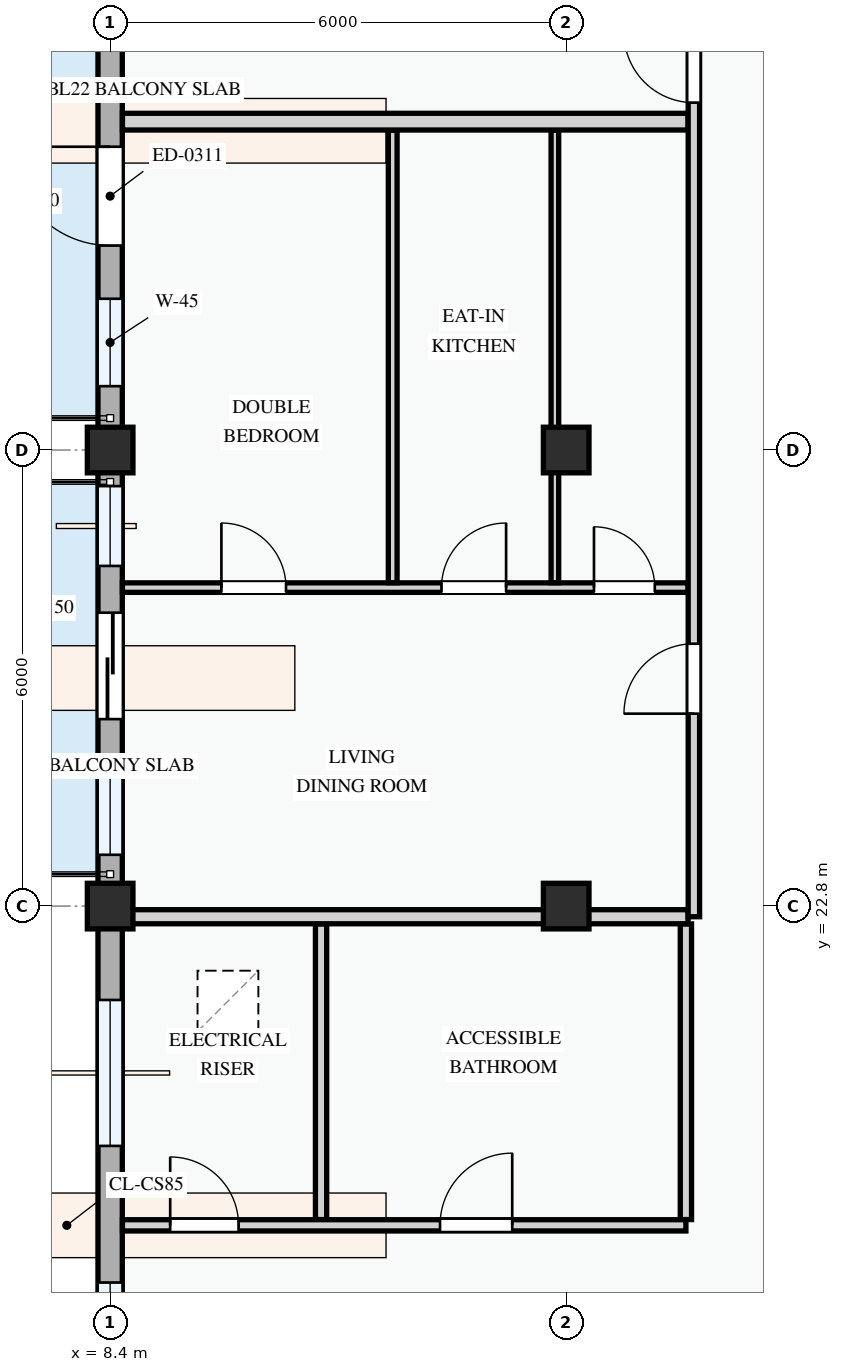
"""IFC4 building model, lengths in metres.
Left out: names, types, materials, properties, quantities, classifications, styles, units other than length and angle.
Written with IfcOpenShell. Run it as: python <this file> out.ifc"""

import sys

from ifc_helpers import new_model, si_unit, direction, frame, frame_2d, origin, origin_2d, place, context, subcontext, project, spatial, rectangle, extrude, element, fill, save


model = new_model("IFC4")
c1 = context("Model", 3, precision=1e-05, world=origin(), true_north=direction((0.0, 1.0)))
c2 = subcontext(c1, "Body", "Model", "MODEL_VIEW")
j1 = project(units=[si_unit("LENGTHUNIT", "METRE"), si_unit("PLANEANGLEUNIT", "RADIAN")], contexts=[c1])
p1 = place(None, origin())
s1 = spatial("IfcSite", under=j1, at=p1, CompositionType="ELEMENT")
p2 = place(p1, origin())
s2 = spatial("IfcBuilding", under=s1, at=p2, CompositionType="ELEMENT")
p3 = place(p2, frame((0.0, 0.0, 14.7)))
s3 = spatial("IfcBuildingStorey", under=s2, at=p3, CompositionType="ELEMENT", Elevation=14.7)
for number, where, z_axis, x_axis in (
    (1, (8.4, 22.8, 0.0), (0.0, 0.0, 1.0), (1.0, 0.0, 0.0)),
    (2, (8.4, 28.8, 0.0), (0.0, 0.0, 1.0), (1.0, 0.0, 0.0)),
    (3, (14.4, 22.8, 0.0), (0.0, 0.0, 1.0), (1.0, 0.0, 0.0)),
    (4, (14.4, 28.8, 0.0), (0.0, 0.0, 1.0), (1.0, 0.0, 0.0)),
):
    element("IfcColumn", number, at=place(p3, frame(where, z_axis=z_axis, x_axis=x_axis)), inside=s3, PredefinedType="COLUMN", context=c2, shape_type="SweptSolid", body=[
        extrude(rectangle(XDim=0.6, YDim=0.6, at=origin_2d()), origin(), (0.0, 0.0, 1.0), 3.3),
    ])
p4 = place(p3, frame((8.4, 37.2, 0.0), z_axis=(0.0, 0.0, 1.0), x_axis=(0.0, -1.0, 0.0)))
e5 = element("IfcWall", 5, at=p4, inside=s3, PredefinedType="STANDARD", context=c2, shape_type="SweptSolid", body=[
    extrude(rectangle(XDim=8.4, YDim=0.32, at=frame_2d((4.2, 0.0))), origin(), (0.0, 0.0, 1.0), 2.345),
])
p5 = place(p4, frame((4.41, 0.0, 0.0)))
e6 = element("IfcOpeningElement", 6, at=p5, cuts=e5, PredefinedType="OPENING", context=c2, shape_type="SweptSolid", body=[
    extrude(rectangle(XDim=1.3, YDim=2.15, at=frame_2d((0.65, 1.075))), frame((0.0, 0.17, 0.0), z_axis=(0.0, -1.0, 0.0), x_axis=(1.0, 0.0, 0.0)), (0.0, 0.0, 1.0), 0.34),
])
p6 = place(p4, frame((1.485, 0.0, 0.78)))
e7 = element("IfcOpeningElement", 7, at=p6, cuts=e5, PredefinedType="OPENING", context=c2, shape_type="SweptSolid", body=[
    extrude(rectangle(XDim=1.3, YDim=1.4, at=frame_2d((0.65, 0.7))), frame((0.0, 0.17, 0.0), z_axis=(0.0, -1.0, 0.0), x_axis=(1.0, 0.0, 0.0)), (0.0, 0.0, 1.0), 0.34),
])
p7 = place(p4, frame((6.41, 0.0, 0.78)))
e8 = element("IfcOpeningElement", 8, at=p7, cuts=e5, PredefinedType="OPENING", context=c2, shape_type="SweptSolid", body=[
    extrude(rectangle(XDim=1.15, YDim=1.25, at=frame_2d((0.575, 0.625))), frame((0.0, 0.17, 0.0), z_axis=(0.0, -1.0, 0.0), x_axis=(1.0, 0.0, 0.0)), (0.0, 0.0, 1.0), 0.34),
])
p8 = place(p3, frame((8.4, 28.8, 0.0), z_axis=(0.0, 0.0, 1.0), x_axis=(0.0, -1.0, 0.0)))
e9 = element("IfcWall", 9, at=p8, inside=s3, PredefinedType="STANDARD", context=c2, shape_type="SweptSolid", body=[
    extrude(rectangle(XDim=6.0, YDim=0.32, at=frame_2d((3.0, 0.0))), origin(), (0.0, 0.0, 1.0), 2.445),
])
p9 = place(p8, frame((2.14, 0.0, 0.0)))
e10 = element("IfcOpeningElement", 10, at=p9, cuts=e9, PredefinedType="OPENING", context=c2, shape_type="SweptSolid", body=[
    extrude(rectangle(XDim=1.4, YDim=2.2, at=frame_2d((0.7, 1.1))), frame((0.0, 0.17, 0.0), z_axis=(0.0, -1.0, 0.0), x_axis=(1.0, 0.0, 0.0)), (0.0, 0.0, 1.0), 0.34),
])
p10 = place(p8, frame((0.475, 0.0, 0.78)))
e11 = element("IfcOpeningElement", 11, at=p10, cuts=e9, PredefinedType="OPENING", context=c2, shape_type="SweptSolid", body=[
    extrude(rectangle(XDim=1.05, YDim=1.2, at=frame_2d((0.525, 0.6))), frame((0.0, 0.17, 0.0), z_axis=(0.0, -1.0, 0.0), x_axis=(1.0, 0.0, 0.0)), (0.0, 0.0, 1.0), 0.34),
])
p11 = place(p8, frame((4.075, 0.0, 0.78)))
e12 = element("IfcOpeningElement", 12, at=p11, cuts=e9, PredefinedType="OPENING", context=c2, shape_type="SweptSolid", body=[
    extrude(rectangle(XDim=1.25, YDim=1.3, at=frame_2d((0.625, 0.65))), frame((0.0, 0.17, 0.0), z_axis=(0.0, -1.0, 0.0), x_axis=(1.0, 0.0, 0.0)), (0.0, 0.0, 1.0), 0.34),
])
p12 = place(p3, frame((8.4, 22.8, 0.0), z_axis=(0.0, 0.0, 1.0), x_axis=(0.0, -1.0, 0.0)))
e13 = element("IfcWall", 13, at=p12, inside=s3, PredefinedType="STANDARD", context=c2, shape_type="SweptSolid", body=[
    extrude(rectangle(XDim=8.4, YDim=0.32, at=frame_2d((4.2, 0.0))), origin(), (0.0, 0.0, 1.0), 2.345),
])
p13 = place(p12, frame((1.235, 0.0, 0.78)))
e14 = element("IfcOpeningElement", 14, at=p13, cuts=e13, PredefinedType="OPENING", context=c2, shape_type="SweptSolid", body=[
    extrude(rectangle(XDim=1.92, YDim=1.44, at=frame_2d((0.96, 0.72))), frame((0.0, 0.17, 0.0), z_axis=(0.0, -1.0, 0.0), x_axis=(1.0, 0.0, 0.0)), (0.0, 0.0, 1.0), 0.34),
])
p14 = place(p12, frame((4.952, 0.0, 0.78)))
e15 = element("IfcOpeningElement", 15, at=p14, cuts=e13, PredefinedType="OPENING", context=c2, shape_type="SweptSolid", body=[
    extrude(rectangle(XDim=1.42, YDim=1.38, at=frame_2d((0.71, 0.69))), frame((0.0, 0.17, 0.0), z_axis=(0.0, -1.0, 0.0), x_axis=(1.0, 0.0, 0.0)), (0.0, 0.0, 1.0), 0.34),
])
for number, where, z_axis, x_axis in (
    (16, (11.175, 18.676, 0.0), (0.0, 0.0, 1.0), (0.0, 1.0, 0.0)),
    (17, (15.975, 18.676, 0.0), (0.0, 0.0, 1.0), (0.0, 1.0, 0.0)),
):
    element("IfcWall", number, at=place(p3, frame(where, z_axis=z_axis, x_axis=x_axis)), inside=s3, PredefinedType="PARTITIONING", context=c2, shape_type="SweptSolid", body=[
        extrude(rectangle(XDim=3.889, YDim=0.148, at=frame_2d((1.945, 0.0))), origin(), (0.0, 0.0, 1.0), 3.0),
    ])
p15 = place(p3, frame((8.562, 18.6, 0.0), z_axis=(0.0, 0.0, 1.0), x_axis=(1.0, 0.0, 0.0)))
e18 = element("IfcWall", 18, at=p15, inside=s3, PredefinedType="PARTITIONING", context=c2, shape_type="SweptSolid", body=[
    extrude(rectangle(XDim=7.413, YDim=0.148, at=frame_2d((3.707, 0.0))), origin(), (0.0, 0.0, 1.0), 3.0),
])
p16 = place(p15, frame((0.628, 0.0, 0.0)))
e19 = element("IfcOpeningElement", 19, at=p16, cuts=e18, PredefinedType="OPENING", context=c2, shape_type="SweptSolid", body=[
    extrude(rectangle(XDim=0.9, YDim=2.1, at=frame_2d((0.45, 1.05))), frame((0.0, 0.084, 0.0), z_axis=(0.0, -1.0, 0.0), x_axis=(1.0, 0.0, 0.0)), (0.0, 0.0, 1.0), 0.168),
])
p17 = place(p15, frame((4.178, 0.0, 0.0)))
e20 = element("IfcOpeningElement", 20, at=p17, cuts=e18, PredefinedType="OPENING", context=c2, shape_type="SweptSolid", body=[
    extrude(rectangle(XDim=0.95, YDim=2.1, at=frame_2d((0.475, 1.05))), frame((0.0, 0.084, 0.0), z_axis=(0.0, -1.0, 0.0), x_axis=(1.0, 0.0, 0.0)), (0.0, 0.0, 1.0), 0.168),
])
p18 = place(p3, frame((8.562, 26.99, 0.0), z_axis=(0.0, 0.0, 1.0), x_axis=(1.0, 0.0, 0.0)))
e21 = element("IfcWall", 21, at=p18, inside=s3, PredefinedType="PARTITIONING", context=c2, shape_type="SweptSolid", body=[
    extrude(rectangle(XDim=7.441, YDim=0.125, at=frame_2d((3.72, 0.0))), origin(), (0.0, 0.0, 1.0), 3.0),
])
p19 = place(p18, frame((1.302, 0.0, 0.0)))
e22 = element("IfcOpeningElement", 22, at=p19, cuts=e21, PredefinedType="OPENING", context=c2, shape_type="SweptSolid", body=[
    extrude(rectangle(XDim=0.85, YDim=2.1, at=frame_2d((0.425, 1.05))), frame((0.0, 0.073, 0.0), z_axis=(0.0, -1.0, 0.0), x_axis=(1.0, 0.0, 0.0)), (0.0, 0.0, 1.0), 0.145),
])
p20 = place(p18, frame((4.198, 0.0, 0.0)))
e23 = element("IfcOpeningElement", 23, at=p20, cuts=e21, PredefinedType="OPENING", context=c2, shape_type="SweptSolid", body=[
    extrude(rectangle(XDim=0.85, YDim=2.1, at=frame_2d((0.425, 1.05))), frame((0.0, 0.073, 0.0), z_axis=(0.0, -1.0, 0.0), x_axis=(1.0, 0.0, 0.0)), (0.0, 0.0, 1.0), 0.145),
])
p21 = place(p18, frame((6.204, 0.0, 0.0)))
e24 = element("IfcOpeningElement", 24, at=p21, cuts=e21, PredefinedType="OPENING", context=c2, shape_type="SweptSolid", body=[
    extrude(rectangle(XDim=0.8, YDim=2.1, at=frame_2d((0.4, 1.05))), frame((0.0, 0.073, 0.0), z_axis=(0.0, -1.0, 0.0), x_axis=(1.0, 0.0, 0.0)), (0.0, 0.0, 1.0), 0.145),
])
p22 = place(p3, frame((12.118, 27.054, 0.0), z_axis=(0.0, 0.0, 1.0), x_axis=(0.0, 1.0, 0.0)))
e25 = element("IfcWall", 25, at=p22, inside=s3, PredefinedType="PARTITIONING", context=c2, shape_type="SweptSolid", body=[
    extrude(rectangle(XDim=5.954, YDim=0.115, at=frame_2d((2.977, 0.0))), origin(), (0.0, 0.0, 1.0), 3.0),
])
p23 = place(p3, frame((14.251, 27.054, 0.0), z_axis=(0.0, 0.0, 1.0), x_axis=(0.0, 1.0, 0.0)))
e26 = element("IfcWall", 26, at=p23, inside=s3, PredefinedType="PARTITIONING", context=c2, shape_type="SweptSolid", body=[
    extrude(rectangle(XDim=5.954, YDim=0.1, at=frame_2d((2.977, 0.0))), origin(), (0.0, 0.0, 1.0), 2.425),
])
p24 = place(p3, frame((8.562, 22.66, 0.0), z_axis=(0.0, 0.0, 1.0), x_axis=(1.0, 0.0, 0.0)))
e27 = element("IfcWall", 27, at=p24, inside=s3, PredefinedType="PARTITIONING", context=c2, shape_type="SweptSolid", body=[
    extrude(rectangle(XDim=7.441, YDim=0.185, at=frame_2d((3.72, 0.0))), origin(), (0.0, 0.0, 1.0), 2.375),
])
p25 = place(p3, frame((8.562, 33.12, 0.0), z_axis=(0.0, 0.0, 1.0), x_axis=(1.0, 0.0, 0.0)))
e28 = element("IfcWall", 28, at=p25, inside=s3, PredefinedType="PARTITIONING", context=c2, shape_type="SweptSolid", body=[
    extrude(rectangle(XDim=7.441, YDim=0.22, at=frame_2d((3.72, 0.0))), origin(), (0.0, 0.0, 1.0), 3.0),
])
p26 = place(p3, frame((16.08, 22.66, 0.0), z_axis=(0.0, 0.0, 1.0), x_axis=(0.0, 1.0, 0.0)))
e29 = element("IfcWall", 29, at=p26, inside=s3, PredefinedType="PARTITIONING", context=c2, shape_type="SweptSolid", body=[
    extrude(rectangle(XDim=34.778, YDim=0.15, at=frame_2d((17.389, 0.0))), origin(), (0.0, 0.0, 1.0), 3.0),
])
p27 = place(p26, frame((2.672, 0.0, 0.0)))
e30 = element("IfcOpeningElement", 30, at=p27, cuts=e29, PredefinedType="OPENING", context=c2, shape_type="SweptSolid", body=[
    extrude(rectangle(XDim=0.92, YDim=2.1, at=frame_2d((0.46, 1.05))), frame((0.0, 0.085, 0.0), z_axis=(0.0, -1.0, 0.0), x_axis=(1.0, 0.0, 0.0)), (0.0, 0.0, 1.0), 0.17),
])
p28 = place(p26, frame((10.71, 0.0, 0.0)))
e31 = element("IfcOpeningElement", 31, at=p28, cuts=e29, PredefinedType="OPENING", context=c2, shape_type="SweptSolid", body=[
    extrude(rectangle(XDim=0.92, YDim=2.1, at=frame_2d((0.46, 1.05))), frame((0.0, 0.085, 0.0), z_axis=(0.0, -1.0, 0.0), x_axis=(1.0, 0.0, 0.0)), (0.0, 0.0, 1.0), 0.17),
])
p29 = place(p26, frame((24.28, 0.0, 0.0)))
e32 = element("IfcOpeningElement", 32, at=p29, cuts=e29, PredefinedType="OPENING", context=c2, shape_type="SweptSolid", body=[
    extrude(rectangle(XDim=0.92, YDim=2.1, at=frame_2d((0.46, 1.05))), frame((0.0, 0.085, 0.0), z_axis=(0.0, -1.0, 0.0), x_axis=(1.0, 0.0, 0.0)), (0.0, 0.0, 1.0), 0.17),
])
p30 = place(p5, frame((1.3, 0.0, 0.0), z_axis=(0.0, 0.0, 1.0), x_axis=(-1.0, 0.0, 0.0)))
e33 = element("IfcDoor", 33, at=p30, inside=s3, OperationType="SINGLE_SWING_RIGHT", PredefinedType="DOOR", context=c2, shape_type="SweptSolid", body=[
    extrude(rectangle(XDim=1.3, YDim=2.15, at=frame_2d((0.65, 1.075))), frame((0.0, 0.025, 0.0), z_axis=(0.0, -1.0, 0.0), x_axis=(1.0, 0.0, 0.0)), (0.0, 0.0, 1.0), 0.05),
])
fill(e6, e33)
p31 = place(p7, origin())
e34 = element("IfcWindow", 34, at=p31, inside=s3, PartitioningType="SINGLE_PANEL", PredefinedType="WINDOW", context=c2, shape_type="SweptSolid", body=[
    extrude(rectangle(XDim=1.15, YDim=1.25, at=frame_2d((0.575, 0.625))), frame((0.0, 0.03, 0.0), z_axis=(0.0, -1.0, 0.0), x_axis=(1.0, 0.0, 0.0)), (0.0, 0.0, 1.0), 0.06),
])
fill(e8, e34)
p32 = place(p9, frame((1.4, 0.0, 0.0), z_axis=(0.0, 0.0, 1.0), x_axis=(-1.0, 0.0, 0.0)))
e35 = element("IfcDoor", 35, at=p32, inside=s3, OperationType="SLIDING_TO_LEFT", PredefinedType="DOOR", context=c2, shape_type="SweptSolid", body=[
    extrude(rectangle(XDim=1.4, YDim=2.2, at=frame_2d((0.7, 1.1))), frame((0.0, 0.025, 0.0), z_axis=(0.0, -1.0, 0.0), x_axis=(1.0, 0.0, 0.0)), (0.0, 0.0, 1.0), 0.05),
])
fill(e10, e35)
p33 = place(p10, origin())
e36 = element("IfcWindow", 36, at=p33, inside=s3, PartitioningType="SINGLE_PANEL", PredefinedType="WINDOW", context=c2, shape_type="SweptSolid", body=[
    extrude(rectangle(XDim=1.05, YDim=1.2, at=frame_2d((0.525, 0.6))), frame((0.0, 0.03, 0.0), z_axis=(0.0, -1.0, 0.0), x_axis=(1.0, 0.0, 0.0)), (0.0, 0.0, 1.0), 0.06),
])
fill(e11, e36)
p34 = place(p11, origin())
e37 = element("IfcWindow", 37, at=p34, inside=s3, PartitioningType="SINGLE_PANEL", PredefinedType="WINDOW", context=c2, shape_type="SweptSolid", body=[
    extrude(rectangle(XDim=1.25, YDim=1.3, at=frame_2d((0.625, 0.65))), frame((0.0, 0.03, 0.0), z_axis=(0.0, -1.0, 0.0), x_axis=(1.0, 0.0, 0.0)), (0.0, 0.0, 1.0), 0.06),
])
fill(e12, e37)
p35 = place(p13, origin())
e38 = element("IfcWindow", 38, at=p35, inside=s3, PartitioningType="DOUBLE_PANEL_VERTICAL", PredefinedType="WINDOW", context=c2, shape_type="SweptSolid", body=[
    extrude(rectangle(XDim=1.92, YDim=1.44, at=frame_2d((0.96, 0.72))), frame((0.0, 0.03, 0.0), z_axis=(0.0, -1.0, 0.0), x_axis=(1.0, 0.0, 0.0)), (0.0, 0.0, 1.0), 0.06),
])
fill(e14, e38)
p36 = place(p14, origin())
e39 = element("IfcWindow", 39, at=p36, inside=s3, PartitioningType="SINGLE_PANEL", PredefinedType="WINDOW", context=c2, shape_type="SweptSolid", body=[
    extrude(rectangle(XDim=1.42, YDim=1.38, at=frame_2d((0.71, 0.69))), frame((0.0, 0.03, 0.0), z_axis=(0.0, -1.0, 0.0), x_axis=(1.0, 0.0, 0.0)), (0.0, 0.0, 1.0), 0.06),
])
fill(e15, e39)
p37 = place(p16, origin())
e40 = element("IfcDoor", 40, at=p37, inside=s3, OperationType="SINGLE_SWING_LEFT", PredefinedType="DOOR", context=c2, shape_type="SweptSolid", body=[
    extrude(rectangle(XDim=0.9, YDim=2.1, at=frame_2d((0.45, 1.05))), frame((0.0, 0.025, 0.0), z_axis=(0.0, -1.0, 0.0), x_axis=(1.0, 0.0, 0.0)), (0.0, 0.0, 1.0), 0.05),
])
fill(e19, e40)
p38 = place(p17, origin())
e41 = element("IfcDoor", 41, at=p38, inside=s3, OperationType="SINGLE_SWING_RIGHT", PredefinedType="DOOR", context=c2, shape_type="SweptSolid", body=[
    extrude(rectangle(XDim=0.95, YDim=2.1, at=frame_2d((0.475, 1.05))), frame((0.0, 0.025, 0.0), z_axis=(0.0, -1.0, 0.0), x_axis=(1.0, 0.0, 0.0)), (0.0, 0.0, 1.0), 0.05),
])
fill(e20, e41)
p39 = place(p19, origin())
e42 = element("IfcDoor", 42, at=p39, inside=s3, OperationType="SINGLE_SWING_LEFT", PredefinedType="DOOR", context=c2, shape_type="SweptSolid", body=[
    extrude(rectangle(XDim=0.85, YDim=2.1, at=frame_2d((0.425, 1.05))), frame((0.0, 0.025, 0.0), z_axis=(0.0, -1.0, 0.0), x_axis=(1.0, 0.0, 0.0)), (0.0, 0.0, 1.0), 0.05),
])
fill(e22, e42)
p40 = place(p20, origin())
e43 = element("IfcDoor", 43, at=p40, inside=s3, OperationType="SINGLE_SWING_RIGHT", PredefinedType="DOOR", context=c2, shape_type="SweptSolid", body=[
    extrude(rectangle(XDim=0.85, YDim=2.1, at=frame_2d((0.425, 1.05))), frame((0.0, 0.025, 0.0), z_axis=(0.0, -1.0, 0.0), x_axis=(1.0, 0.0, 0.0)), (0.0, 0.0, 1.0), 0.05),
])
fill(e23, e43)
p41 = place(p21, origin())
e44 = element("IfcDoor", 44, at=p41, inside=s3, OperationType="SINGLE_SWING_LEFT", PredefinedType="DOOR", context=c2, shape_type="SweptSolid", body=[
    extrude(rectangle(XDim=0.8, YDim=2.1, at=frame_2d((0.4, 1.05))), frame((0.0, 0.025, 0.0), z_axis=(0.0, -1.0, 0.0), x_axis=(1.0, 0.0, 0.0)), (0.0, 0.0, 1.0), 0.05),
])
fill(e24, e44)
p42 = place(p27, origin())
e45 = element("IfcDoor", 45, at=p42, inside=s3, OperationType="SINGLE_SWING_LEFT", PredefinedType="DOOR", context=c2, shape_type="SweptSolid", body=[
    extrude(rectangle(XDim=0.92, YDim=2.1, at=frame_2d((0.46, 1.05))), frame((0.0, 0.025, 0.0), z_axis=(0.0, -1.0, 0.0), x_axis=(1.0, 0.0, 0.0)), (0.0, 0.0, 1.0), 0.05),
])
fill(e30, e45)
p43 = place(p28, origin())
e46 = element("IfcDoor", 46, at=p43, inside=s3, OperationType="SINGLE_SWING_RIGHT", PredefinedType="DOOR", context=c2, shape_type="SweptSolid", body=[
    extrude(rectangle(XDim=0.92, YDim=2.1, at=frame_2d((0.46, 1.05))), frame((0.0, 0.025, 0.0), z_axis=(0.0, -1.0, 0.0), x_axis=(1.0, 0.0, 0.0)), (0.0, 0.0, 1.0), 0.05),
])
fill(e31, e46)
save(model, sys.argv[1])
